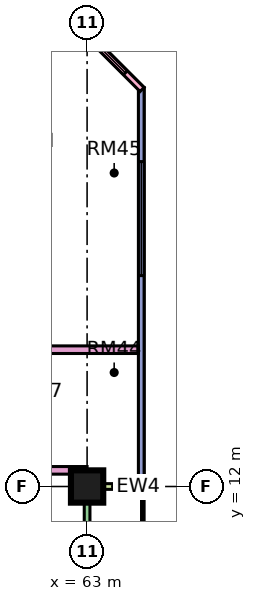
"""IFC4 building model, lengths in metres.
Left out: names, types, materials, properties, quantities, classifications, styles, units other than length and angle.
Written with IfcOpenShell. Run it as: python <this file> out.ifc"""

import sys

from ifc_helpers import new_model, si_unit, direction, frame, frame_2d, origin, origin_2d, place, context, subcontext, project, spatial, rectangle, extrude, element, fill, save


model = new_model("IFC4")
c1 = context("Model", 3, precision=1e-05, world=origin(), true_north=direction((0.0, 1.0)))
c2 = subcontext(c1, "Body", "Model", "MODEL_VIEW")
j1 = project(units=[si_unit("LENGTHUNIT", "METRE"), si_unit("PLANEANGLEUNIT", "RADIAN")], contexts=[c1])
p1 = place(None, origin())
s1 = spatial("IfcSite", under=j1, at=p1, CompositionType="ELEMENT")
p2 = place(p1, origin())
s2 = spatial("IfcBuilding", under=s1, at=p2, CompositionType="ELEMENT")
p3 = place(p2, frame((0.0, 0.0, 234.15)))
s3 = spatial("IfcBuildingStorey", under=s2, at=p3, CompositionType="ELEMENT", Elevation=234.15)
p4 = place(p3, frame((63.0, 12.0, 0.0), z_axis=(0.0, 0.0, 1.0), x_axis=(1.0, 0.0, 0.0)))
e1 = element("IfcColumn", 1, at=p4, inside=s3, PredefinedType="COLUMN", context=c2, shape_type="SweptSolid", body=[
    extrude(rectangle(XDim=0.85, YDim=0.85, at=origin_2d()), origin(), (0.0, 0.0, 1.0), 3.75),
])
p5 = place(p3, frame((63.0, 1.575, 0.0), z_axis=(0.0, 0.0, 1.0), x_axis=(0.0, 1.0, 0.0)))
e2 = element("IfcWall", 2, at=p5, inside=s3, PredefinedType="SOLIDWALL", context=c2, shape_type="SweptSolid", body=[
    extrude(rectangle(XDim=10.35, YDim=0.15, at=frame_2d((5.175, 0.0))), origin(), (0.0, 0.0, 1.0), 3.35),
])
p6 = place(p5, frame((2.425, 0.0, 0.0)))
e3 = element("IfcOpeningElement", 3, at=p6, cuts=e2, PredefinedType="OPENING", context=c2, shape_type="SweptSolid", body=[
    extrude(rectangle(XDim=1.8, YDim=2.4, at=frame_2d((0.9, 1.2))), frame((0.0, 0.085, 0.0), z_axis=(0.0, -1.0, 0.0), x_axis=(1.0, 0.0, 0.0)), (0.0, 0.0, 1.0), 0.17),
])
p7 = place(p5, frame((7.075, 0.0, 0.45)))
e4 = element("IfcOpeningElement", 4, at=p7, cuts=e2, PredefinedType="OPENING", context=c2, shape_type="SweptSolid", body=[
    extrude(rectangle(XDim=2.4, YDim=2.4, at=frame_2d((1.2, 1.2))), frame((0.0, 0.085, 0.0), z_axis=(0.0, -1.0, 0.0), x_axis=(1.0, 0.0, 0.0)), (0.0, 0.0, 1.0), 0.17),
])
p8 = place(p3, frame((64.5, 12.0, 0.0), z_axis=(0.0, 0.0, 1.0), x_axis=(-1.0, 0.0, 0.0)))
e5 = element("IfcWall", 5, at=p8, inside=s3, PredefinedType="SOLIDWALL", context=c2, shape_type="SweptSolid", body=[
    extrude(rectangle(XDim=1.5, YDim=0.15, at=frame_2d((0.75, 0.0))), origin(), (0.0, 0.0, 1.0), 3.35),
])
p9 = place(p3, frame((64.425, 12.075, 0.0), z_axis=(0.0, 0.0, 1.0), x_axis=(0.0, 1.0, 0.0)))
e6 = element("IfcWall", 6, at=p9, inside=s3, PredefinedType="SOLIDWALL", context=c2, shape_type="SweptSolid", body=[
    extrude(rectangle(XDim=10.425, YDim=0.15, at=frame_2d((5.212, 0.0))), origin(), (0.0, 0.0, 1.0), 3.35),
])
p10 = place(p9, frame((5.475, 0.0, 0.45)))
e7 = element("IfcOpeningElement", 7, at=p10, cuts=e6, PredefinedType="OPENING", context=c2, shape_type="SweptSolid", body=[
    extrude(rectangle(XDim=3.0, YDim=2.4, at=frame_2d((1.5, 1.2))), frame((0.0, 0.085, 0.0), z_axis=(0.0, -1.0, 0.0), x_axis=(1.0, 0.0, 0.0)), (0.0, 0.0, 1.0), 0.17),
])
p11 = place(p3, frame((64.447, 22.447, 0.0), z_axis=(0.0, 0.0, 1.0), x_axis=(-0.707106781187, 0.707106781187, 0.0)))
e8 = element("IfcWall", 8, at=p11, inside=s3, PredefinedType="SOLIDWALL", context=c2, shape_type="SweptSolid", body=[
    extrude(rectangle(XDim=4.243, YDim=0.15, at=frame_2d((2.121, 0.0))), origin(), (0.0, 0.0, 1.0), 3.35),
])
p12 = place(p11, frame((0.621, 0.0, 0.45)))
e9 = element("IfcOpeningElement", 9, at=p12, cuts=e8, PredefinedType="OPENING", context=c2, shape_type="SweptSolid", body=[
    extrude(rectangle(XDim=3.0, YDim=2.4, at=frame_2d((1.5, 1.2))), frame((0.0, 0.085, 0.0), z_axis=(0.0, -1.0, 0.0), x_axis=(1.0, 0.0, 0.0)), (0.0, 0.0, 1.0), 0.17),
])
p13 = place(p3, frame((40.65, 12.425, 0.0), z_axis=(0.0, 0.0, 1.0), x_axis=(1.0, 0.0, 0.0)))
e10 = element("IfcWall", 10, at=p13, inside=s3, PredefinedType="PARTITIONING", context=c2, shape_type="SweptSolid", body=[
    extrude(rectangle(XDim=22.35, YDim=0.2, at=frame_2d((11.175, 0.0))), origin(), (0.0, 0.0, 1.0), 3.35),
])
p14 = place(p13, frame((14.7, 0.0, 0.0)))
e11 = element("IfcOpeningElement", 11, at=p14, cuts=e10, PredefinedType="OPENING", context=c2, shape_type="SweptSolid", body=[
    extrude(rectangle(XDim=1.0, YDim=2.1, at=frame_2d((0.5, 1.05))), frame((0.0, 0.11, 0.0), z_axis=(0.0, -1.0, 0.0), x_axis=(1.0, 0.0, 0.0)), (0.0, 0.0, 1.0), 0.22),
])
p15 = place(p13, frame((1.05, 0.0, 0.0)))
e12 = element("IfcOpeningElement", 12, at=p15, cuts=e10, PredefinedType="OPENING", context=c2, shape_type="SweptSolid", body=[
    extrude(rectangle(XDim=1.0, YDim=2.1, at=frame_2d((0.5, 1.05))), frame((0.0, 0.11, 0.0), z_axis=(0.0, -1.0, 0.0), x_axis=(1.0, 0.0, 0.0)), (0.0, 0.0, 1.0), 0.22),
])
p16 = place(p3, frame((51.225, 15.6, 0.0), z_axis=(0.0, 0.0, 1.0), x_axis=(1.0, 0.0, 0.0)))
e13 = element("IfcWall", 13, at=p16, inside=s3, PredefinedType="PARTITIONING", context=c2, shape_type="SweptSolid", body=[
    extrude(rectangle(XDim=13.125, YDim=0.2, at=frame_2d((6.562, 0.0))), origin(), (0.0, 0.0, 1.0), 3.35),
])
p17 = place(p16, frame((9.725, 0.0, 0.0)))
e14 = element("IfcOpeningElement", 14, at=p17, cuts=e13, PredefinedType="OPENING", context=c2, shape_type="SweptSolid", body=[
    extrude(rectangle(XDim=1.0, YDim=2.1, at=frame_2d((0.5, 1.05))), frame((0.0, 0.11, 0.0), z_axis=(0.0, -1.0, 0.0), x_axis=(1.0, 0.0, 0.0)), (0.0, 0.0, 1.0), 0.22),
])
p18 = place(p16, frame((0.875, 0.0, 0.0)))
e15 = element("IfcOpeningElement", 15, at=p18, cuts=e13, PredefinedType="OPENING", context=c2, shape_type="SweptSolid", body=[
    extrude(rectangle(XDim=1.0, YDim=2.1, at=frame_2d((0.5, 1.05))), frame((0.0, 0.11, 0.0), z_axis=(0.0, -1.0, 0.0), x_axis=(1.0, 0.0, 0.0)), (0.0, 0.0, 1.0), 0.22),
])
p19 = place(p10, origin())
e16 = element("IfcWindow", 16, at=p19, inside=s3, PartitioningType="SINGLE_PANEL", PredefinedType="WINDOW", context=c2, shape_type="SweptSolid", body=[
    extrude(rectangle(XDim=3.0, YDim=2.4, at=frame_2d((1.5, 1.2))), frame((0.0, 0.03, 0.0), z_axis=(0.0, -1.0, 0.0), x_axis=(1.0, 0.0, 0.0)), (0.0, 0.0, 1.0), 0.06),
])
fill(e7, e16)
p20 = place(p12, origin())
e17 = element("IfcWindow", 17, at=p20, inside=s3, PartitioningType="SINGLE_PANEL", PredefinedType="WINDOW", context=c2, shape_type="SweptSolid", body=[
    extrude(rectangle(XDim=3.0, YDim=2.4, at=frame_2d((1.5, 1.2))), frame((0.0, 0.03, 0.0), z_axis=(0.0, -1.0, 0.0), x_axis=(1.0, 0.0, 0.0)), (0.0, 0.0, 1.0), 0.06),
])
fill(e9, e17)
save(model, sys.argv[1])
